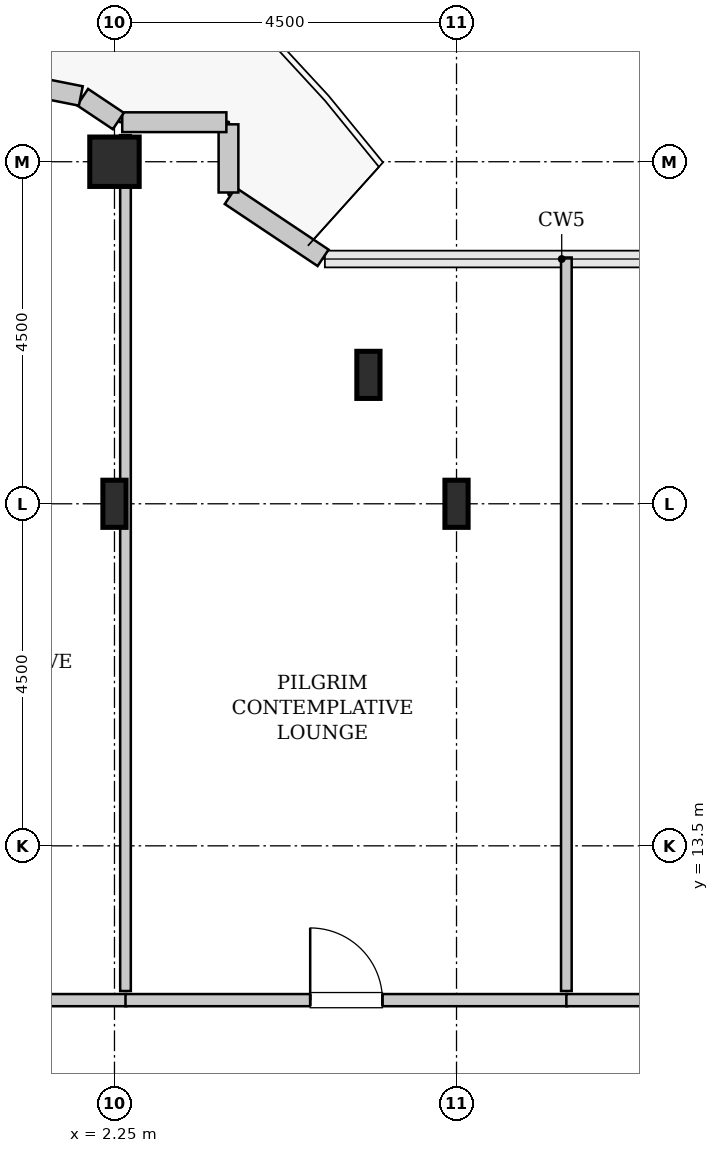
"""IFC4 building model, lengths in metres.
Left out: names, types, materials, properties, quantities, classifications, styles, units other than length and angle.
Written with IfcOpenShell. Run it as: python <this file> out.ifc"""

import sys

from ifc_helpers import new_model, si_unit, direction, frame, frame_2d, origin, origin_2d, place, context, subcontext, project, spatial, rectangle, hollow_rectangle, i_section, extrude, source, transform, mapped, element, fill, save


model = new_model("IFC4")
c1 = context("Model", 3, precision=1e-05, world=origin(), true_north=direction((0.0, 1.0)))
c2 = subcontext(c1, "Body", "Model", "MODEL_VIEW")
j1 = project(units=[si_unit("LENGTHUNIT", "METRE"), si_unit("PLANEANGLEUNIT", "RADIAN")], contexts=[c1])
p1 = place(None, origin())
s1 = spatial("IfcSite", under=j1, at=p1, CompositionType="ELEMENT")
p2 = place(p1, origin())
s2 = spatial("IfcBuilding", under=s1, at=p2, CompositionType="ELEMENT")
p3 = place(p2, frame((0.0, 0.0, 264.6)))
s3 = spatial("IfcBuildingStorey", under=s2, at=p3, CompositionType="ELEMENT", Elevation=264.6)
m1 = source(origin(), c2, "Body", "SweptSolid", [
    extrude(i_section(OverallWidth=0.305, OverallDepth=0.62, WebThickness=0.021, FlangeThickness=0.04, FilletRadius=0.027, at=origin_2d()), origin(), (0.0, 0.0, 1.0), 3.8),
])
p4 = place(p3, frame((2.25, 18.0, 0.0), z_axis=(0.0, 0.0, 1.0), x_axis=(1.0, 0.0, 0.0)))
e1 = element("IfcColumn", 1, at=p4, inside=s3, PredefinedType="COLUMN", context=c2, shape_type="MappedRepresentation", body=[
    mapped(m1, transform((0.0, 0.0, 0.0), x_axis=(1.0, 0.0, 0.0), y_axis=(0.0, 1.0, 0.0), z_axis=(0.0, 0.0, 1.0), scale=1.0)),
])
m2 = source(origin(), c2, "Body", "SweptSolid", [
    extrude(hollow_rectangle(XDim=0.65, YDim=0.65, WallThickness=0.032, InnerFilletRadius=0.032, OuterFilletRadius=0.064, at=origin_2d()), origin(), (0.0, 0.0, 1.0), 3.8),
])
p5 = place(p3, frame((2.25, 22.5, 0.0), z_axis=(0.0, 0.0, 1.0), x_axis=(1.0, 0.0, 0.0)))
e2 = element("IfcColumn", 2, at=p5, inside=s3, PredefinedType="COLUMN", context=c2, shape_type="MappedRepresentation", body=[
    mapped(m2, transform((0.0, 0.0, 0.0), x_axis=(1.0, 0.0, 0.0), y_axis=(0.0, 1.0, 0.0), z_axis=(0.0, 0.0, 1.0), scale=1.0)),
])
for number, where, z_axis, x_axis in (
    (3, (5.591, 19.696, 0.0), (0.0, 0.0, 1.0), (1.0, 0.0, 0.0)),
    (4, (6.75, 18.0, 0.0), (0.0, 0.0, 1.0), (1.0, 0.0, 0.0)),
):
    element("IfcColumn", number, at=place(p3, frame(where, z_axis=z_axis, x_axis=x_axis)), inside=s3, PredefinedType="COLUMN", context=c2, shape_type="MappedRepresentation", body=[
        mapped(m1, transform((0.0, 0.0, 0.0), x_axis=(1.0, 0.0, 0.0), y_axis=(0.0, 1.0, 0.0), z_axis=(0.0, 0.0, 1.0), scale=1.0)),
    ])
m3 = source(origin(), c2, "Body", "SweptSolid", [
    extrude(rectangle(XDim=1.469, YDim=0.26, at=frame_2d((0.734, 0.0))), origin(), (0.0, 0.0, 1.0), 3.55),
])
p6 = place(p3, frame((4.995, 21.236, 0.0), z_axis=(0.0, 0.0, 1.0), x_axis=(-0.831461760506, 0.555581983884, 0.0)))
e5 = element("IfcWall", 5, at=p6, inside=s3, PredefinedType="SOLIDWALL", context=c2, shape_type="MappedRepresentation", body=[
    mapped(m3, transform((0.0, 0.0, 0.0), x_axis=(1.0, 0.0, 0.0), y_axis=(0.0, 1.0, 0.0), z_axis=(0.0, 0.0, 1.0), scale=1.0)),
])
m4 = source(origin(), c2, "Body", "SweptSolid", [
    extrude(rectangle(XDim=0.897, YDim=0.26, at=frame_2d((0.448, 0.0))), origin(), (0.0, 0.0, 1.0), 3.55),
])
p7 = place(p3, frame((3.75, 22.095, 0.0), z_axis=(0.0, 0.0, 1.0), x_axis=(0.0, 1.0, 0.0)))
e6 = element("IfcWall", 6, at=p7, inside=s3, PredefinedType="SOLIDWALL", context=c2, shape_type="MappedRepresentation", body=[
    mapped(m4, transform((0.0, 0.0, 0.0), x_axis=(1.0, 0.0, 0.0), y_axis=(0.0, 1.0, 0.0), z_axis=(0.0, 0.0, 1.0), scale=1.0)),
])
m5 = source(origin(), c2, "Body", "SweptSolid", [
    extrude(rectangle(XDim=1.37, YDim=0.26, at=frame_2d((0.685, 0.0))), origin(), (0.0, 0.0, 1.0), 3.55),
])
p8 = place(p3, frame((3.722, 23.02, 0.0), z_axis=(0.0, 0.0, 1.0), x_axis=(-1.0, 0.0, 0.0)))
e7 = element("IfcWall", 7, at=p8, inside=s3, PredefinedType="SOLIDWALL", context=c2, shape_type="MappedRepresentation", body=[
    mapped(m5, transform((0.0, 0.0, 0.0), x_axis=(1.0, 0.0, 0.0), y_axis=(0.0, 1.0, 0.0), z_axis=(0.0, 0.0, 1.0), scale=1.0)),
])
m6 = source(origin(), c2, "Body", "SweptSolid", [
    extrude(rectangle(XDim=0.565, YDim=0.26, at=frame_2d((0.283, 0.0))), origin(), (0.0, 0.0, 1.0), 3.55),
])
p9 = place(p3, frame((2.301, 23.036, 0.0), z_axis=(0.0, 0.0, 1.0), x_axis=(-0.831651492666, 0.555297933317, 0.0)))
e8 = element("IfcWall", 8, at=p9, inside=s3, PredefinedType="SOLIDWALL", context=c2, shape_type="MappedRepresentation", body=[
    mapped(m6, transform((0.0, 0.0, 0.0), x_axis=(1.0, 0.0, 0.0), y_axis=(0.0, 1.0, 0.0), z_axis=(0.0, 0.0, 1.0), scale=1.0)),
])
m7 = source(origin(), c2, "Body", "SweptSolid", [
    extrude(rectangle(XDim=4.137, YDim=0.26, at=frame_2d((2.068, 0.0))), origin(), (0.0, 0.0, 1.0), 3.55),
])
p10 = place(p3, frame((1.807, 23.365, 0.0), z_axis=(0.0, 0.0, 1.0), x_axis=(-0.980782170794, 0.195105954428, 0.0)))
e9 = element("IfcWall", 9, at=p10, inside=s3, PredefinedType="SOLIDWALL", context=c2, shape_type="MappedRepresentation", body=[
    mapped(m7, transform((0.0, 0.0, 0.0), x_axis=(1.0, 0.0, 0.0), y_axis=(0.0, 1.0, 0.0), z_axis=(0.0, 0.0, 1.0), scale=1.0)),
])
p11 = place(p10, frame((0.488, 0.0, 0.0)))
e10 = element("IfcOpeningElement", 10, at=p11, cuts=e9, PredefinedType="OPENING", context=c2, shape_type="SweptSolid", body=[
    extrude(rectangle(XDim=1.1, YDim=2.2, at=frame_2d((0.55, 1.1))), frame((0.0, 0.14, 0.0), z_axis=(0.0, -1.0, 0.0), x_axis=(1.0, 0.0, 0.0)), (0.0, 0.0, 1.0), 0.28),
])
m8 = source(origin(), c2, "Body", "SweptSolid", [
    extrude(rectangle(XDim=3.705, YDim=0.16, at=frame_2d((1.853, 0.0))), origin(), (0.0, 0.0, 1.0), 3.535),
])
p12 = place(p3, frame((-1.3, 11.47, 0.0), z_axis=(0.0, 0.0, 1.0), x_axis=(1.0, 0.0, 0.0)))
e11 = element("IfcWall", 11, at=p12, inside=s3, PredefinedType="PARTITIONING", context=c2, shape_type="MappedRepresentation", body=[
    mapped(m8, transform((0.0, 0.0, 0.0), x_axis=(1.0, 0.0, 0.0), y_axis=(0.0, 1.0, 0.0), z_axis=(0.0, 0.0, 1.0), scale=1.0)),
])
p13 = place(p12, frame((1.377, 0.0, 0.0)))
e12 = element("IfcOpeningElement", 12, at=p13, cuts=e11, PredefinedType="OPENING", context=c2, shape_type="SweptSolid", body=[
    extrude(rectangle(XDim=0.95, YDim=2.1, at=frame_2d((0.475, 1.05))), frame((0.0, 0.09, 0.0), z_axis=(0.0, -1.0, 0.0), x_axis=(1.0, 0.0, 0.0)), (0.0, 0.0, 1.0), 0.18),
])
m9 = source(origin(), c2, "Body", "SweptSolid", [
    extrude(rectangle(XDim=11.26, YDim=0.14, at=frame_2d((5.63, 0.0))), origin(), (0.0, 0.0, 1.0), 2.925),
])
p14 = place(p3, frame((2.395, 11.59, 0.0), z_axis=(0.0, 0.0, 1.0), x_axis=(0.0, 1.0, 0.0)))
e13 = element("IfcWall", 13, at=p14, inside=s3, PredefinedType="PARTITIONING", context=c2, shape_type="MappedRepresentation", body=[
    mapped(m9, transform((0.0, 0.0, 0.0), x_axis=(1.0, 0.0, 0.0), y_axis=(0.0, 1.0, 0.0), z_axis=(0.0, 0.0, 1.0), scale=1.0)),
])
m10 = source(origin(), c2, "Body", "SweptSolid", [
    extrude(rectangle(XDim=5.81, YDim=0.16, at=frame_2d((2.905, 0.0))), origin(), (0.0, 0.0, 1.0), 3.535),
])
p15 = place(p3, frame((2.395, 11.47, 0.0), z_axis=(0.0, 0.0, 1.0), x_axis=(1.0, 0.0, 0.0)))
e14 = element("IfcWall", 14, at=p15, inside=s3, PredefinedType="PARTITIONING", context=c2, shape_type="MappedRepresentation", body=[
    mapped(m10, transform((0.0, 0.0, 0.0), x_axis=(1.0, 0.0, 0.0), y_axis=(0.0, 1.0, 0.0), z_axis=(0.0, 0.0, 1.0), scale=1.0)),
])
p16 = place(p15, frame((2.43, 0.0, 0.0)))
e15 = element("IfcOpeningElement", 15, at=p16, cuts=e14, PredefinedType="OPENING", context=c2, shape_type="SweptSolid", body=[
    extrude(rectangle(XDim=0.95, YDim=2.1, at=frame_2d((0.475, 1.05))), frame((0.0, 0.09, 0.0), z_axis=(0.0, -1.0, 0.0), x_axis=(1.0, 0.0, 0.0)), (0.0, 0.0, 1.0), 0.18),
])
m11 = source(origin(), c2, "Body", "SweptSolid", [
    extrude(rectangle(XDim=9.65, YDim=0.14, at=frame_2d((4.825, 0.0))), origin(), (0.0, 0.0, 1.0), 3.535),
])
p17 = place(p3, frame((8.195, 11.59, 0.0), z_axis=(0.0, 0.0, 1.0), x_axis=(0.0, 1.0, 0.0)))
e16 = element("IfcWall", 16, at=p17, inside=s3, PredefinedType="PARTITIONING", context=c2, shape_type="MappedRepresentation", body=[
    mapped(m11, transform((0.0, 0.0, 0.0), x_axis=(1.0, 0.0, 0.0), y_axis=(0.0, 1.0, 0.0), z_axis=(0.0, 0.0, 1.0), scale=1.0)),
])
m12 = source(origin(), c2, "Body", "SweptSolid", [
    extrude(rectangle(XDim=5.425, YDim=0.16, at=frame_2d((2.712, 0.0))), origin(), (0.0, 0.0, 1.0), 3.535),
])
p18 = place(p3, frame((8.195, 11.47, 0.0), z_axis=(0.0, 0.0, 1.0), x_axis=(1.0, 0.0, 0.0)))
e17 = element("IfcWall", 17, at=p18, inside=s3, PredefinedType="PARTITIONING", context=c2, shape_type="MappedRepresentation", body=[
    mapped(m12, transform((0.0, 0.0, 0.0), x_axis=(1.0, 0.0, 0.0), y_axis=(0.0, 1.0, 0.0), z_axis=(0.0, 0.0, 1.0), scale=1.0)),
])
p19 = place(p18, frame((2.238, 0.0, 0.0)))
e18 = element("IfcOpeningElement", 18, at=p19, cuts=e17, PredefinedType="OPENING", context=c2, shape_type="SweptSolid", body=[
    extrude(rectangle(XDim=0.95, YDim=2.1, at=frame_2d((0.475, 1.05))), frame((0.0, 0.09, 0.0), z_axis=(0.0, -1.0, 0.0), x_axis=(1.0, 0.0, 0.0)), (0.0, 0.0, 1.0), 0.18),
])
m13 = source(origin(), c2, "Body", "SweptSolid", [
    extrude(rectangle(XDim=0.95, YDim=2.1, at=frame_2d((0.475, 1.05))), frame((0.0, 0.025, 0.0), z_axis=(0.0, -1.0, 0.0), x_axis=(1.0, 0.0, 0.0)), (0.0, 0.0, 1.0), 0.05),
])
p20 = place(p16, origin())
e19 = element("IfcDoor", 19, at=p20, inside=s3, OperationType="SINGLE_SWING_LEFT", PredefinedType="DOOR", context=c2, shape_type="MappedRepresentation", body=[
    mapped(m13, transform((0.0, 0.0, 0.0), x_axis=(1.0, 0.0, 0.0), y_axis=(0.0, 1.0, 0.0), z_axis=(0.0, 0.0, 1.0), scale=1.0)),
])
fill(e15, e19)
save(model, sys.argv[1])
